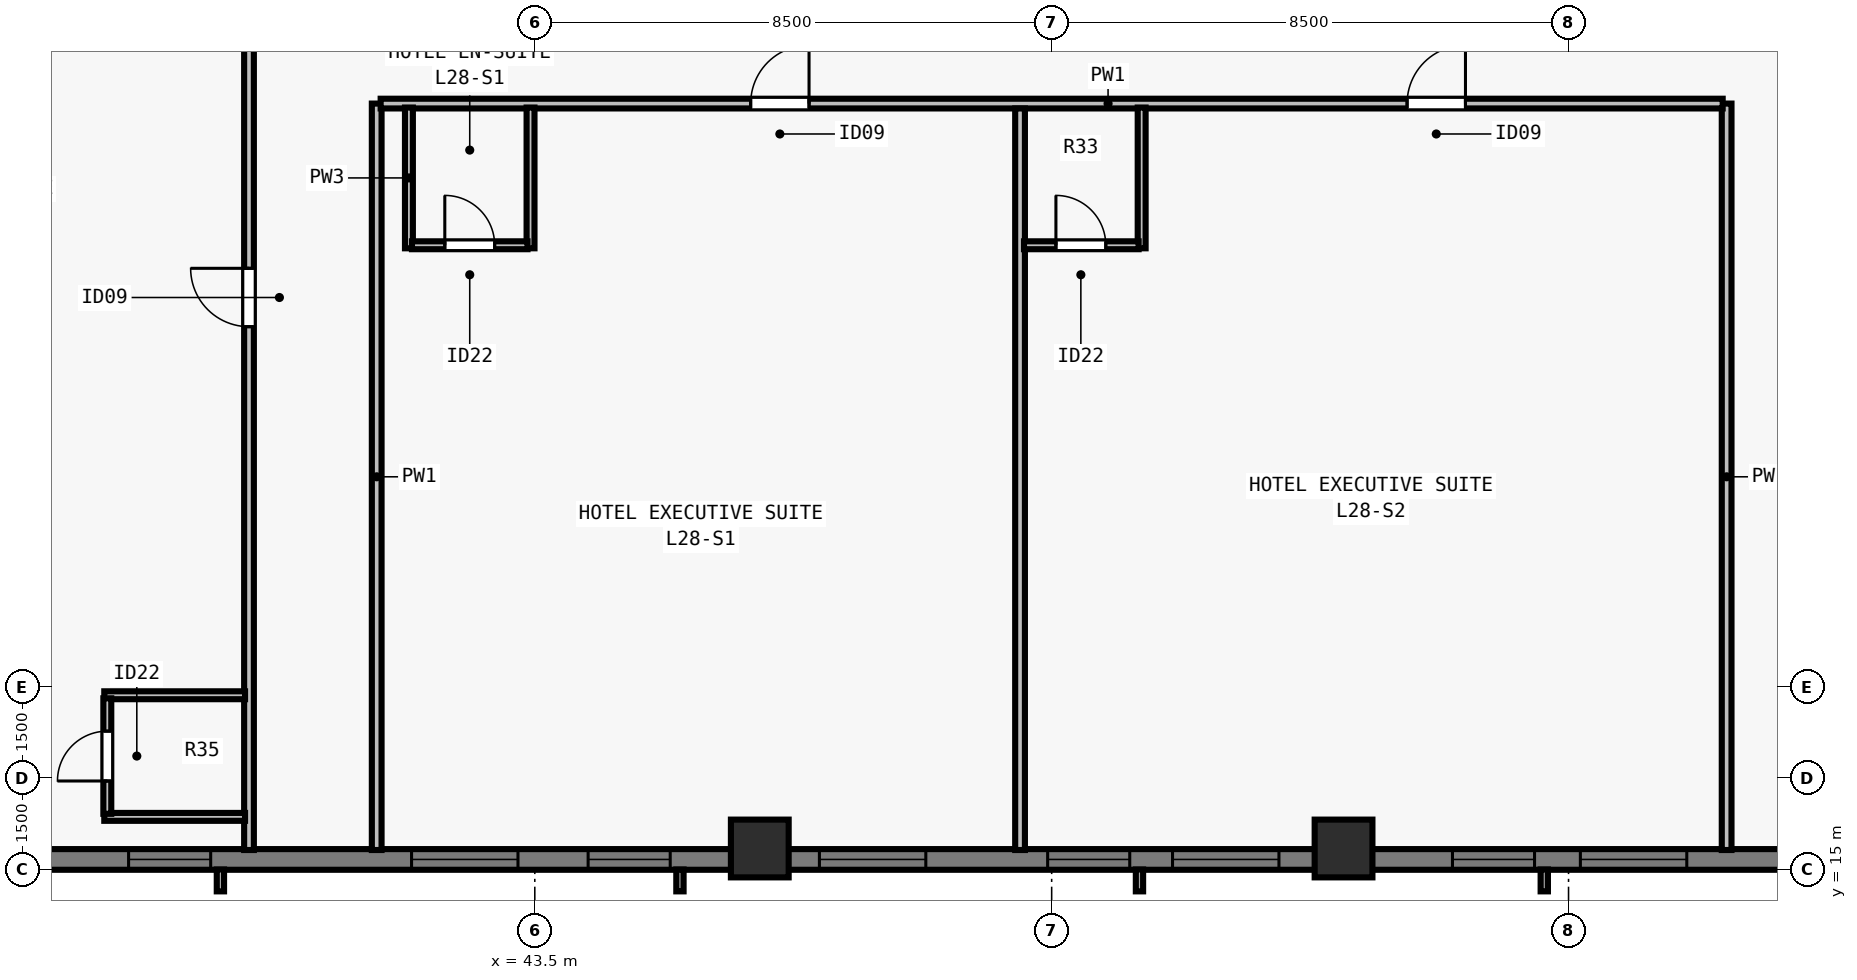
"""IFC4 building model, lengths in metres.
Left out: names, types, materials, properties, quantities, classifications, styles, units other than length and angle.
Written with IfcOpenShell. Run it as: python <this file> out.ifc"""

import sys

from ifc_helpers import new_model, si_unit, direction, frame, frame_2d, origin, origin_2d, place, context, subcontext, project, spatial, rectangle, extrude, element, fill, save


model = new_model("IFC4")
c1 = context("Model", 3, precision=1e-05, world=origin(), true_north=direction((0.0, 1.0)))
c2 = subcontext(c1, "Body", "Model", "MODEL_VIEW")
j1 = project(units=[si_unit("LENGTHUNIT", "METRE"), si_unit("PLANEANGLEUNIT", "RADIAN")], contexts=[c1])
p1 = place(None, origin())
s1 = spatial("IfcSite", under=j1, at=p1, CompositionType="ELEMENT")
p2 = place(p1, origin())
s2 = spatial("IfcBuilding", under=s1, at=p2, CompositionType="ELEMENT")
p3 = place(p2, frame((0.0, 0.0, 106.0)))
s3 = spatial("IfcBuildingStorey", under=s2, at=p3, CompositionType="ELEMENT", Elevation=106.0)
for number, where, z_axis, x_axis in (
    (1, (47.2, 15.35, 0.0), (0.0, 0.0, 1.0), (1.0, 0.0, 0.0)),
    (2, (56.8, 15.35, 0.0), (0.0, 0.0, 1.0), (1.0, 0.0, 0.0)),
):
    element("IfcColumn", number, at=place(p3, frame(where, z_axis=z_axis, x_axis=x_axis)), inside=s3, PredefinedType="COLUMN", context=c2, shape_type="SweptSolid", body=[
        extrude(rectangle(XDim=0.95, YDim=0.95, at=origin_2d()), origin(), (0.0, 0.0, 1.0), 3.5),
    ])
p4 = place(p3, frame((72.0, 15.17, 0.0), z_axis=(0.0, 0.0, 1.0), x_axis=(-1.0, 0.0, 0.0)))
e3 = element("IfcWall", 3, at=p4, inside=s3, PredefinedType="SOLIDWALL", context=c2, shape_type="SweptSolid", body=[
    extrude(rectangle(XDim=39.682, YDim=0.34, at=frame_2d((19.841, 0.0))), origin(), (0.0, 0.0, 1.0), 3.28),
])
p5 = place(p4, frame((4.952, 0.0, 0.8)))
e4 = element("IfcOpeningElement", 4, at=p5, cuts=e3, PredefinedType="OPENING", context=c2, shape_type="SweptSolid", body=[
    extrude(rectangle(XDim=1.35, YDim=1.66, at=frame_2d((0.675, 0.83))), frame((0.0, 0.18, 0.0), z_axis=(0.0, -1.0, 0.0), x_axis=(1.0, 0.0, 0.0)), (0.0, 0.0, 1.0), 0.36),
])
p6 = place(p4, frame((9.555, 0.0, 0.8)))
e5 = element("IfcOpeningElement", 5, at=p6, cuts=e3, PredefinedType="OPENING", context=c2, shape_type="SweptSolid", body=[
    extrude(rectangle(XDim=1.75, YDim=1.66, at=frame_2d((0.875, 0.83))), frame((0.0, 0.18, 0.0), z_axis=(0.0, -1.0, 0.0), x_axis=(1.0, 0.0, 0.0)), (0.0, 0.0, 1.0), 0.36),
])
p7 = place(p4, frame((12.059, 0.0, 0.8)))
e6 = element("IfcOpeningElement", 6, at=p7, cuts=e3, PredefinedType="OPENING", context=c2, shape_type="SweptSolid", body=[
    extrude(rectangle(XDim=1.35, YDim=1.66, at=frame_2d((0.675, 0.83))), frame((0.0, 0.18, 0.0), z_axis=(0.0, -1.0, 0.0), x_axis=(1.0, 0.0, 0.0)), (0.0, 0.0, 1.0), 0.36),
])
p8 = place(p4, frame((16.262, 0.0, 0.8)))
e7 = element("IfcOpeningElement", 7, at=p8, cuts=e3, PredefinedType="OPENING", context=c2, shape_type="SweptSolid", body=[
    extrude(rectangle(XDim=1.75, YDim=1.66, at=frame_2d((0.875, 0.83))), frame((0.0, 0.18, 0.0), z_axis=(0.0, -1.0, 0.0), x_axis=(1.0, 0.0, 0.0)), (0.0, 0.0, 1.0), 0.36),
])
p9 = place(p4, frame((18.716, 0.0, 0.8)))
e8 = element("IfcOpeningElement", 8, at=p9, cuts=e3, PredefinedType="OPENING", context=c2, shape_type="SweptSolid", body=[
    extrude(rectangle(XDim=1.35, YDim=1.66, at=frame_2d((0.675, 0.83))), frame((0.0, 0.18, 0.0), z_axis=(0.0, -1.0, 0.0), x_axis=(1.0, 0.0, 0.0)), (0.0, 0.0, 1.0), 0.36),
])
p10 = place(p4, frame((22.07, 0.0, 0.8)))
e9 = element("IfcOpeningElement", 9, at=p10, cuts=e3, PredefinedType="OPENING", context=c2, shape_type="SweptSolid", body=[
    extrude(rectangle(XDim=1.75, YDim=1.66, at=frame_2d((0.875, 0.83))), frame((0.0, 0.18, 0.0), z_axis=(0.0, -1.0, 0.0), x_axis=(1.0, 0.0, 0.0)), (0.0, 0.0, 1.0), 0.36),
])
p11 = place(p4, frame((26.273, 0.0, 0.8)))
e10 = element("IfcOpeningElement", 10, at=p11, cuts=e3, PredefinedType="OPENING", context=c2, shape_type="SweptSolid", body=[
    extrude(rectangle(XDim=1.35, YDim=1.66, at=frame_2d((0.675, 0.83))), frame((0.0, 0.18, 0.0), z_axis=(0.0, -1.0, 0.0), x_axis=(1.0, 0.0, 0.0)), (0.0, 0.0, 1.0), 0.36),
])
p12 = place(p4, frame((28.777, 0.0, 0.8)))
e11 = element("IfcOpeningElement", 11, at=p12, cuts=e3, PredefinedType="OPENING", context=c2, shape_type="SweptSolid", body=[
    extrude(rectangle(XDim=1.75, YDim=1.66, at=frame_2d((0.875, 0.83))), frame((0.0, 0.18, 0.0), z_axis=(0.0, -1.0, 0.0), x_axis=(1.0, 0.0, 0.0)), (0.0, 0.0, 1.0), 0.36),
])
p13 = place(p4, frame((33.83, 0.0, 0.8)))
e12 = element("IfcOpeningElement", 12, at=p13, cuts=e3, PredefinedType="OPENING", context=c2, shape_type="SweptSolid", body=[
    extrude(rectangle(XDim=1.35, YDim=1.66, at=frame_2d((0.675, 0.83))), frame((0.0, 0.18, 0.0), z_axis=(0.0, -1.0, 0.0), x_axis=(1.0, 0.0, 0.0)), (0.0, 0.0, 1.0), 0.36),
])
p14 = place(p3, frame((38.8, 15.325, 0.0), z_axis=(0.0, 0.0, 1.0), x_axis=(0.0, 1.0, 0.0)))
e13 = element("IfcWall", 13, at=p14, inside=s3, PredefinedType="PARTITIONING", context=c2, shape_type="SweptSolid", body=[
    extrude(rectangle(XDim=47.35, YDim=0.16, at=frame_2d((23.675, 0.0))), origin(), (0.0, 0.0, 1.0), 2.555),
])
p15 = place(p14, frame((8.606, 0.0, 0.0)))
e14 = element("IfcOpeningElement", 14, at=p15, cuts=e13, PredefinedType="OPENING", context=c2, shape_type="SweptSolid", body=[
    extrude(rectangle(XDim=0.96, YDim=2.15, at=frame_2d((0.48, 1.075))), frame((0.0, 0.09, 0.0), z_axis=(0.0, -1.0, 0.0), x_axis=(1.0, 0.0, 0.0)), (0.0, 0.0, 1.0), 0.18),
])
p16 = place(p14, frame((24.218, 0.0, 0.0)))
e15 = element("IfcOpeningElement", 15, at=p16, cuts=e13, PredefinedType="OPENING", context=c2, shape_type="SweptSolid", body=[
    extrude(rectangle(XDim=0.96, YDim=2.15, at=frame_2d((0.48, 1.075))), frame((0.0, 0.09, 0.0), z_axis=(0.0, -1.0, 0.0), x_axis=(1.0, 0.0, 0.0)), (0.0, 0.0, 1.0), 0.18),
])
p17 = place(p14, frame((40.107, 0.0, 0.0)))
e16 = element("IfcOpeningElement", 16, at=p17, cuts=e13, PredefinedType="OPENING", context=c2, shape_type="SweptSolid", body=[
    extrude(rectangle(XDim=0.96, YDim=2.15, at=frame_2d((0.48, 1.075))), frame((0.0, 0.09, 0.0), z_axis=(0.0, -1.0, 0.0), x_axis=(1.0, 0.0, 0.0)), (0.0, 0.0, 1.0), 0.18),
])
for number, where, z_axis, x_axis in (
    (17, (40.9, 15.325, 0.0), (0.0, 0.0, 1.0), (0.0, 1.0, 0.0)),
    (18, (63.1, 15.325, 0.0), (0.0, 0.0, 1.0), (0.0, 1.0, 0.0)),
):
    element("IfcWall", number, at=place(p3, frame(where, z_axis=z_axis, x_axis=x_axis)), inside=s3, PredefinedType="PARTITIONING", context=c2, shape_type="SweptSolid", body=[
        extrude(rectangle(XDim=12.275, YDim=0.16, at=frame_2d((6.138, 0.0))), origin(), (0.0, 0.0, 1.0), 2.555),
    ])
p18 = place(p3, frame((40.965, 27.6, 0.0), z_axis=(0.0, 0.0, 1.0), x_axis=(1.0, 0.0, 0.0)))
e19 = element("IfcWall", 19, at=p18, inside=s3, PredefinedType="PARTITIONING", context=c2, shape_type="SweptSolid", body=[
    extrude(rectangle(XDim=22.07, YDim=0.16, at=frame_2d((11.035, 0.0))), origin(), (0.0, 0.0, 1.0), 3.28),
])
p19 = place(p18, frame((6.085, 0.0, 0.0)))
e20 = element("IfcOpeningElement", 20, at=p19, cuts=e19, PredefinedType="OPENING", context=c2, shape_type="SweptSolid", body=[
    extrude(rectangle(XDim=0.96, YDim=2.15, at=frame_2d((0.48, 1.075))), frame((0.0, 0.09, 0.0), z_axis=(0.0, -1.0, 0.0), x_axis=(1.0, 0.0, 0.0)), (0.0, 0.0, 1.0), 0.18),
])
p20 = place(p18, frame((16.88, 0.0, 0.0)))
e21 = element("IfcOpeningElement", 21, at=p20, cuts=e19, PredefinedType="OPENING", context=c2, shape_type="SweptSolid", body=[
    extrude(rectangle(XDim=0.96, YDim=2.15, at=frame_2d((0.48, 1.075))), frame((0.0, 0.09, 0.0), z_axis=(0.0, -1.0, 0.0), x_axis=(1.0, 0.0, 0.0)), (0.0, 0.0, 1.0), 0.18),
])
for number, where, z_axis, x_axis in (
    (22, (41.43, 25.22, 0.0), (0.0, 0.0, 1.0), (0.0, 1.0, 0.0)),
    (23, (43.43, 25.22, 0.0), (0.0, 0.0, 1.0), (0.0, 1.0, 0.0)),
):
    element("IfcWall", number, at=place(p3, frame(where, z_axis=z_axis, x_axis=x_axis)), inside=s3, PredefinedType="PLUMBINGWALL", context=c2, shape_type="SweptSolid", body=[
        extrude(rectangle(XDim=2.315, YDim=0.13, at=frame_2d((1.157, 0.0))), origin(), (0.0, 0.0, 1.0), 3.28),
    ])
p21 = place(p3, frame((41.48, 25.27, 0.0), z_axis=(0.0, 0.0, 1.0), x_axis=(1.0, 0.0, 0.0)))
e24 = element("IfcWall", 24, at=p21, inside=s3, PredefinedType="PLUMBINGWALL", context=c2, shape_type="SweptSolid", body=[
    extrude(rectangle(XDim=1.9, YDim=0.13, at=frame_2d((0.95, 0.0))), origin(), (0.0, 0.0, 1.0), 3.28),
])
p22 = place(p21, frame((0.54, 0.0, 0.0)))
e25 = element("IfcOpeningElement", 25, at=p22, cuts=e24, PredefinedType="OPENING", context=c2, shape_type="SweptSolid", body=[
    extrude(rectangle(XDim=0.82, YDim=2.1, at=frame_2d((0.41, 1.05))), frame((0.0, 0.075, 0.0), z_axis=(0.0, -1.0, 0.0), x_axis=(1.0, 0.0, 0.0)), (0.0, 0.0, 1.0), 0.15),
])
p23 = place(p3, frame((51.48, 15.325, 0.0), z_axis=(0.0, 0.0, 1.0), x_axis=(0.0, 1.0, 0.0)))
e26 = element("IfcWall", 26, at=p23, inside=s3, PredefinedType="PARTITIONING", context=c2, shape_type="SweptSolid", body=[
    extrude(rectangle(XDim=12.195, YDim=0.16, at=frame_2d((6.098, 0.0))), origin(), (0.0, 0.0, 1.0), 2.896),
])
p24 = place(p3, frame((53.48, 25.22, 0.0), z_axis=(0.0, 0.0, 1.0), x_axis=(0.0, 1.0, 0.0)))
e27 = element("IfcWall", 27, at=p24, inside=s3, PredefinedType="PLUMBINGWALL", context=c2, shape_type="SweptSolid", body=[
    extrude(rectangle(XDim=2.315, YDim=0.13, at=frame_2d((1.157, 0.0))), origin(), (0.0, 0.0, 1.0), 2.896),
])
p25 = place(p3, frame((51.545, 25.27, 0.0), z_axis=(0.0, 0.0, 1.0), x_axis=(1.0, 0.0, 0.0)))
e28 = element("IfcWall", 28, at=p25, inside=s3, PredefinedType="PLUMBINGWALL", context=c2, shape_type="SweptSolid", body=[
    extrude(rectangle(XDim=1.885, YDim=0.13, at=frame_2d((0.942, 0.0))), origin(), (0.0, 0.0, 1.0), 3.28),
])
p26 = place(p25, frame((0.525, 0.0, 0.0)))
e29 = element("IfcOpeningElement", 29, at=p26, cuts=e28, PredefinedType="OPENING", context=c2, shape_type="SweptSolid", body=[
    extrude(rectangle(XDim=0.82, YDim=2.1, at=frame_2d((0.41, 1.05))), frame((0.0, 0.075, 0.0), z_axis=(0.0, -1.0, 0.0), x_axis=(1.0, 0.0, 0.0)), (0.0, 0.0, 1.0), 0.15),
])
for number, where, z_axis, x_axis in (
    (30, (36.42, 15.87, 0.0), (0.0, 0.0, 1.0), (1.0, 0.0, 0.0)),
    (31, (36.42, 17.87, 0.0), (0.0, 0.0, 1.0), (1.0, 0.0, 0.0)),
):
    element("IfcWall", number, at=place(p3, frame(where, z_axis=z_axis, x_axis=x_axis)), inside=s3, PredefinedType="PLUMBINGWALL", context=c2, shape_type="SweptSolid", body=[
        extrude(rectangle(XDim=2.315, YDim=0.13, at=frame_2d((1.158, 0.0))), origin(), (0.0, 0.0, 1.0), 3.28),
    ])
p27 = place(p3, frame((36.47, 15.92, 0.0), z_axis=(0.0, 0.0, 1.0), x_axis=(0.0, 1.0, 0.0)))
e32 = element("IfcWall", 32, at=p27, inside=s3, PredefinedType="PLUMBINGWALL", context=c2, shape_type="SweptSolid", body=[
    extrude(rectangle(XDim=1.9, YDim=0.13, at=frame_2d((0.95, 0.0))), origin(), (0.0, 0.0, 1.0), 3.28),
])
p28 = place(p27, frame((0.54, 0.0, 0.0)))
e33 = element("IfcOpeningElement", 33, at=p28, cuts=e32, PredefinedType="OPENING", context=c2, shape_type="SweptSolid", body=[
    extrude(rectangle(XDim=0.82, YDim=2.1, at=frame_2d((0.41, 1.05))), frame((0.0, 0.075, 0.0), z_axis=(0.0, -1.0, 0.0), x_axis=(1.0, 0.0, 0.0)), (0.0, 0.0, 1.0), 0.15),
])
p29 = place(p6, origin())
e34 = element("IfcWindow", 34, at=p29, inside=s3, PartitioningType="SINGLE_PANEL", PredefinedType="WINDOW", context=c2, shape_type="SweptSolid", body=[
    extrude(rectangle(XDim=1.75, YDim=1.66, at=frame_2d((0.875, 0.83))), frame((0.0, -0.05, 0.0), z_axis=(0.0, -1.0, 0.0), x_axis=(1.0, 0.0, 0.0)), (0.0, 0.0, 1.0), 0.06),
])
fill(e5, e34)
p30 = place(p7, origin())
e35 = element("IfcWindow", 35, at=p30, inside=s3, PartitioningType="SINGLE_PANEL", PredefinedType="WINDOW", context=c2, shape_type="SweptSolid", body=[
    extrude(rectangle(XDim=1.35, YDim=1.66, at=frame_2d((0.675, 0.83))), frame((0.0, -0.05, 0.0), z_axis=(0.0, -1.0, 0.0), x_axis=(1.0, 0.0, 0.0)), (0.0, 0.0, 1.0), 0.06),
])
fill(e6, e35)
p31 = place(p8, origin())
e36 = element("IfcWindow", 36, at=p31, inside=s3, PartitioningType="SINGLE_PANEL", PredefinedType="WINDOW", context=c2, shape_type="SweptSolid", body=[
    extrude(rectangle(XDim=1.75, YDim=1.66, at=frame_2d((0.875, 0.83))), frame((0.0, -0.05, 0.0), z_axis=(0.0, -1.0, 0.0), x_axis=(1.0, 0.0, 0.0)), (0.0, 0.0, 1.0), 0.06),
])
fill(e7, e36)
p32 = place(p9, origin())
e37 = element("IfcWindow", 37, at=p32, inside=s3, PartitioningType="SINGLE_PANEL", PredefinedType="WINDOW", context=c2, shape_type="SweptSolid", body=[
    extrude(rectangle(XDim=1.35, YDim=1.66, at=frame_2d((0.675, 0.83))), frame((0.0, -0.05, 0.0), z_axis=(0.0, -1.0, 0.0), x_axis=(1.0, 0.0, 0.0)), (0.0, 0.0, 1.0), 0.06),
])
fill(e8, e37)
p33 = place(p10, origin())
e38 = element("IfcWindow", 38, at=p33, inside=s3, PartitioningType="SINGLE_PANEL", PredefinedType="WINDOW", context=c2, shape_type="SweptSolid", body=[
    extrude(rectangle(XDim=1.75, YDim=1.66, at=frame_2d((0.875, 0.83))), frame((0.0, -0.05, 0.0), z_axis=(0.0, -1.0, 0.0), x_axis=(1.0, 0.0, 0.0)), (0.0, 0.0, 1.0), 0.06),
])
fill(e9, e38)
p34 = place(p11, origin())
e39 = element("IfcWindow", 39, at=p34, inside=s3, PartitioningType="SINGLE_PANEL", PredefinedType="WINDOW", context=c2, shape_type="SweptSolid", body=[
    extrude(rectangle(XDim=1.35, YDim=1.66, at=frame_2d((0.675, 0.83))), frame((0.0, -0.05, 0.0), z_axis=(0.0, -1.0, 0.0), x_axis=(1.0, 0.0, 0.0)), (0.0, 0.0, 1.0), 0.06),
])
fill(e10, e39)
p35 = place(p12, origin())
e40 = element("IfcWindow", 40, at=p35, inside=s3, PartitioningType="SINGLE_PANEL", PredefinedType="WINDOW", context=c2, shape_type="SweptSolid", body=[
    extrude(rectangle(XDim=1.75, YDim=1.66, at=frame_2d((0.875, 0.83))), frame((0.0, -0.05, 0.0), z_axis=(0.0, -1.0, 0.0), x_axis=(1.0, 0.0, 0.0)), (0.0, 0.0, 1.0), 0.06),
])
fill(e11, e40)
p36 = place(p13, origin())
e41 = element("IfcWindow", 41, at=p36, inside=s3, PartitioningType="SINGLE_PANEL", PredefinedType="WINDOW", context=c2, shape_type="SweptSolid", body=[
    extrude(rectangle(XDim=1.35, YDim=1.66, at=frame_2d((0.675, 0.83))), frame((0.0, -0.05, 0.0), z_axis=(0.0, -1.0, 0.0), x_axis=(1.0, 0.0, 0.0)), (0.0, 0.0, 1.0), 0.06),
])
fill(e12, e41)
p37 = place(p22, origin())
e42 = element("IfcDoor", 42, at=p37, inside=s3, OperationType="SINGLE_SWING_LEFT", PredefinedType="DOOR", context=c2, shape_type="SweptSolid", body=[
    extrude(rectangle(XDim=0.82, YDim=2.1, at=frame_2d((0.41, 1.05))), frame((0.0, 0.025, 0.0), z_axis=(0.0, -1.0, 0.0), x_axis=(1.0, 0.0, 0.0)), (0.0, 0.0, 1.0), 0.05),
])
fill(e25, e42)
p38 = place(p19, origin())
e43 = element("IfcDoor", 43, at=p38, inside=s3, OperationType="SINGLE_SWING_RIGHT", PredefinedType="DOOR", context=c2, shape_type="SweptSolid", body=[
    extrude(rectangle(XDim=0.96, YDim=2.15, at=frame_2d((0.48, 1.075))), frame((0.0, 0.025, 0.0), z_axis=(0.0, -1.0, 0.0), x_axis=(1.0, 0.0, 0.0)), (0.0, 0.0, 1.0), 0.05),
])
fill(e20, e43)
p39 = place(p26, origin())
e44 = element("IfcDoor", 44, at=p39, inside=s3, OperationType="SINGLE_SWING_LEFT", PredefinedType="DOOR", context=c2, shape_type="SweptSolid", body=[
    extrude(rectangle(XDim=0.82, YDim=2.1, at=frame_2d((0.41, 1.05))), frame((0.0, 0.025, 0.0), z_axis=(0.0, -1.0, 0.0), x_axis=(1.0, 0.0, 0.0)), (0.0, 0.0, 1.0), 0.05),
])
fill(e29, e44)
p40 = place(p20, origin())
e45 = element("IfcDoor", 45, at=p40, inside=s3, OperationType="SINGLE_SWING_RIGHT", PredefinedType="DOOR", context=c2, shape_type="SweptSolid", body=[
    extrude(rectangle(XDim=0.96, YDim=2.15, at=frame_2d((0.48, 1.075))), frame((0.0, 0.025, 0.0), z_axis=(0.0, -1.0, 0.0), x_axis=(1.0, 0.0, 0.0)), (0.0, 0.0, 1.0), 0.05),
])
fill(e21, e45)
p41 = place(p28, origin())
e46 = element("IfcDoor", 46, at=p41, inside=s3, OperationType="SINGLE_SWING_LEFT", PredefinedType="DOOR", context=c2, shape_type="SweptSolid", body=[
    extrude(rectangle(XDim=0.82, YDim=2.1, at=frame_2d((0.41, 1.05))), frame((0.0, 0.025, 0.0), z_axis=(0.0, -1.0, 0.0), x_axis=(1.0, 0.0, 0.0)), (0.0, 0.0, 1.0), 0.05),
])
fill(e33, e46)
p42 = place(p15, origin())
e47 = element("IfcDoor", 47, at=p42, inside=s3, OperationType="SINGLE_SWING_RIGHT", PredefinedType="DOOR", context=c2, shape_type="SweptSolid", body=[
    extrude(rectangle(XDim=0.96, YDim=2.15, at=frame_2d((0.48, 1.075))), frame((0.0, 0.025, 0.0), z_axis=(0.0, -1.0, 0.0), x_axis=(1.0, 0.0, 0.0)), (0.0, 0.0, 1.0), 0.05),
])
fill(e14, e47)
save(model, sys.argv[1])
